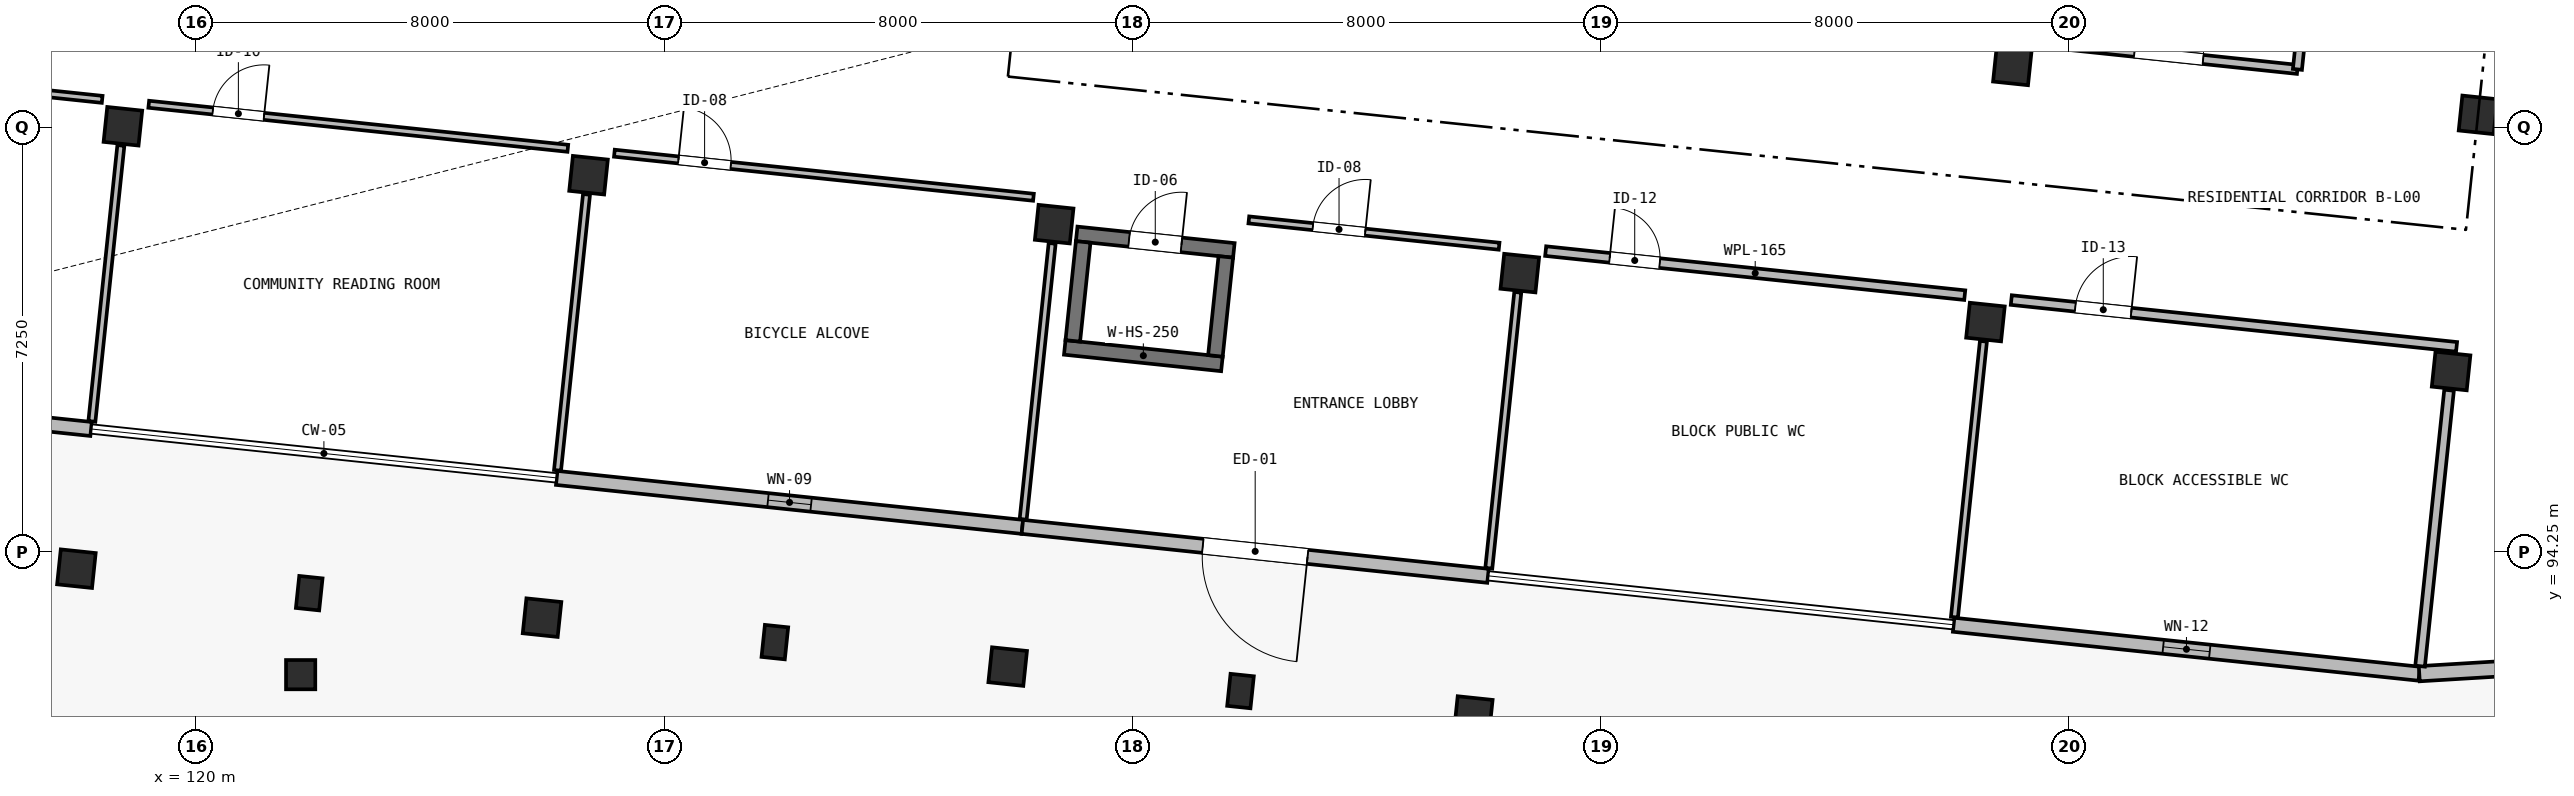
"""IFC4 building model, lengths in metres.
Left out: names, types, materials, properties, quantities, classifications, styles, units other than length and angle.
Written with IfcOpenShell. Run it as: python <this file> out.ifc"""

import sys

from ifc_helpers import new_model, si_unit, direction, frame, frame_2d, origin, origin_2d, place, context, subcontext, project, spatial, rectangle, extrude, element, fill, save


model = new_model("IFC4")
c1 = context("Model", 3, precision=1e-05, world=origin(), true_north=direction((0.0, 1.0)))
c2 = subcontext(c1, "Body", "Model", "MODEL_VIEW")
j1 = project(units=[si_unit("LENGTHUNIT", "METRE"), si_unit("PLANEANGLEUNIT", "RADIAN")], contexts=[c1])
p1 = place(None, origin())
s1 = spatial("IfcSite", under=j1, at=p1, CompositionType="ELEMENT")
p2 = place(p1, origin())
s2 = spatial("IfcBuilding", under=s1, at=p2, CompositionType="ELEMENT")
p3 = place(p2, origin())
s3 = spatial("IfcBuildingStorey", under=s2, at=p3, CompositionType="ELEMENT", Elevation=0.0)
for number, where, z_axis, x_axis in (
    (1, (117.956, 93.964, -0.35), (0.0, 0.0, 1.0), (0.995, -0.105, 0.0)),
    (2, (118.75, 101.522, -0.35), (0.0, 0.0, 1.0), (0.995, -0.105, 0.0)),
    (3, (125.912, 93.127, -0.35), (0.0, 0.0, 1.0), (0.995, -0.105, 0.0)),
    (4, (126.707, 100.686, -0.35), (0.0, 0.0, 1.0), (0.995, -0.105, 0.0)),
    (5, (133.868, 92.291, -0.35), (0.0, 0.0, 1.0), (0.995, -0.105, 0.0)),
    (6, (134.663, 99.85, -0.35), (0.0, 0.0, 1.0), (0.995, -0.105, 0.0)),
    (7, (141.825, 91.455, -0.35), (0.0, 0.0, 1.0), (0.995, -0.105, 0.0)),
    (8, (142.619, 99.013, -0.35), (0.0, 0.0, 1.0), (0.995, -0.105, 0.0)),
    (9, (150.575, 98.177, -0.35), (0.0, 0.0, 1.0), (0.995, -0.105, 0.0)),
    (10, (151.035, 102.553, -0.35), (0.0, 0.0, 1.0), (0.995, -0.105, 0.0)),
    (11, (158.531, 97.341, -0.35), (0.0, 0.0, 1.0), (0.995, -0.105, 0.0)),
    (12, (158.991, 101.717, -0.35), (0.0, 0.0, 1.0), (0.995, -0.105, 0.0)),
):
    element("IfcColumn", number, at=place(p3, frame(where, z_axis=z_axis, x_axis=x_axis)), inside=s3, PredefinedType="COLUMN", context=c2, shape_type="SweptSolid", body=[
        extrude(rectangle(XDim=0.6, YDim=0.6, at=origin_2d()), origin(), (0.0, 0.0, 1.0), 4.85),
    ])
for number, where, z_axis, x_axis in (
    (13, (121.934, 93.546, -0.35), (0.0, 0.0, 1.0), (0.995, -0.105, 0.0)),
    (14, (129.89, 92.709, -0.35), (0.0, 0.0, 1.0), (0.995, -0.105, 0.0)),
    (15, (137.847, 91.873, -0.35), (0.0, 0.0, 1.0), (0.995, -0.105, 0.0)),
):
    element("IfcColumn", number, at=place(p3, frame(where, z_axis=z_axis, x_axis=x_axis)), inside=s3, PredefinedType="PILASTER", context=c2, shape_type="SweptSolid", body=[
        extrude(rectangle(XDim=0.4, YDim=0.55, at=origin_2d()), origin(), (0.0, 0.0, 1.0), 3.7),
    ])
p4 = place(p3, frame((134.844, 97.744, -0.35), z_axis=(0.0, 0.0, 1.0), x_axis=(0.994522285292, -0.104524753323, 0.0)))
e16 = element("IfcWall", 16, at=p4, inside=s3, PredefinedType="SHEAR", context=c2, shape_type="SweptSolid", body=[
    extrude(rectangle(XDim=2.7, YDim=0.25, at=frame_2d((1.35, 0.0))), origin(), (0.0, 0.0, 1.0), 4.85),
])
p5 = place(p3, frame((135.048, 99.684, -0.35), z_axis=(0.0, 0.0, 1.0), x_axis=(0.994522285292, -0.104524753323, 0.0)))
e17 = element("IfcWall", 17, at=p5, inside=s3, PredefinedType="SHEAR", context=c2, shape_type="SweptSolid", body=[
    extrude(rectangle(XDim=2.7, YDim=0.25, at=frame_2d((1.35, 0.0))), origin(), (0.0, 0.0, 1.0), 4.85),
])
p6 = place(p5, frame((0.9, 0.0, 0.35)))
e18 = element("IfcOpeningElement", 18, at=p6, cuts=e17, PredefinedType="OPENING", context=c2, shape_type="SweptSolid", body=[
    extrude(rectangle(XDim=0.9, YDim=2.05, at=frame_2d((0.45, 1.025))), frame((0.0, 0.14, 0.0), z_axis=(0.0, -1.0, 0.0), x_axis=(1.0, 0.0, 0.0)), (0.0, 0.0, 1.0), 0.28),
])
for number, where, z_axis, x_axis in (
    (19, (134.981, 97.855, -0.35), (0.0, 0.0, 1.0), (0.105, 0.995, 0.0)),
    (20, (137.418, 97.599, -0.35), (0.0, 0.0, 1.0), (0.105, 0.995, 0.0)),
):
    element("IfcWall", number, at=place(p3, frame(where, z_axis=z_axis, x_axis=x_axis)), inside=s3, PredefinedType="SHEAR", context=c2, shape_type="SweptSolid", body=[
        extrude(rectangle(XDim=1.7, YDim=0.25, at=frame_2d((0.85, 0.0))), origin(), (0.0, 0.0, 1.0), 4.85),
    ])
p7 = place(p3, frame((121.788, 92.153, -0.35), z_axis=(0.0, 0.0, 1.0), x_axis=(1.0, 0.0, 0.0)))
e21 = element("IfcColumn", 21, at=p7, inside=s3, PredefinedType="COLUMN", context=c2, shape_type="SweptSolid", body=[
    extrude(rectangle(XDim=0.5, YDim=0.5, at=origin_2d()), origin(), (0.0, 0.0, 1.0), 4.55),
])
p8 = place(p3, frame((118.207, 96.351, 0.0), z_axis=(0.0, 0.0, 1.0), x_axis=(-0.994522329422, 0.104524333444, 0.0)))
e22 = element("IfcWall", 22, at=p8, inside=s3, PredefinedType="SOLIDWALL", context=c2, shape_type="SweptSolid", body=[
    extrude(rectangle(XDim=8.0, YDim=0.24, at=frame_2d((4.0, 0.0))), origin(), (0.0, 0.0, 1.0), 3.35),
])
p9 = place(p8, frame((3.65, 0.0, 0.55)))
e23 = element("IfcOpeningElement", 23, at=p9, cuts=e22, PredefinedType="OPENING", context=c2, shape_type="SweptSolid", body=[
    extrude(rectangle(XDim=0.7, YDim=2.36, at=frame_2d((0.35, 1.18))), frame((0.0, 0.135, 0.0), z_axis=(0.0, -1.0, 0.0), x_axis=(1.0, 0.0, 0.0)), (0.0, 0.0, 1.0), 0.27),
])
p10 = place(p3, frame((134.119, 94.678, 0.0), z_axis=(0.0, 0.0, 1.0), x_axis=(-0.994522329422, 0.104524333444, 0.0)))
e24 = element("IfcWall", 24, at=p10, inside=s3, PredefinedType="SOLIDWALL", context=c2, shape_type="SweptSolid", body=[
    extrude(rectangle(XDim=8.0, YDim=0.24, at=frame_2d((4.0, 0.0))), origin(), (0.0, 0.0, 1.0), 3.35),
])
p11 = place(p10, frame((3.63, 0.0, 0.55)))
e25 = element("IfcOpeningElement", 25, at=p11, cuts=e24, PredefinedType="OPENING", context=c2, shape_type="SweptSolid", body=[
    extrude(rectangle(XDim=0.74, YDim=2.26, at=frame_2d((0.37, 1.13))), frame((0.0, 0.135, 0.0), z_axis=(0.0, -1.0, 0.0), x_axis=(1.0, 0.0, 0.0)), (0.0, 0.0, 1.0), 0.27),
])
p12 = place(p3, frame((142.076, 93.842, 0.0), z_axis=(0.0, 0.0, 1.0), x_axis=(-0.994522662826, 0.104521161134, 0.0)))
e26 = element("IfcWall", 26, at=p12, inside=s3, PredefinedType="SOLIDWALL", context=c2, shape_type="SweptSolid", body=[
    extrude(rectangle(XDim=8.0, YDim=0.24, at=frame_2d((4.0, 0.0))), origin(), (0.0, 0.0, 1.0), 3.35),
])
p13 = place(p12, frame((3.1, 0.0, 0.0)))
e27 = element("IfcOpeningElement", 27, at=p13, cuts=e26, PredefinedType="OPENING", context=c2, shape_type="SweptSolid", body=[
    extrude(rectangle(XDim=1.8, YDim=2.4, at=frame_2d((0.9, 1.2))), frame((0.0, 0.135, 0.0), z_axis=(0.0, -1.0, 0.0), x_axis=(1.0, 0.0, 0.0)), (0.0, 0.0, 1.0), 0.27),
])
p14 = place(p3, frame((157.988, 92.169, 0.0), z_axis=(0.0, 0.0, 1.0), x_axis=(-0.994522662826, 0.104521161134, 0.0)))
e28 = element("IfcWall", 28, at=p14, inside=s3, PredefinedType="SOLIDWALL", context=c2, shape_type="SweptSolid", body=[
    extrude(rectangle(XDim=8.0, YDim=0.24, at=frame_2d((4.0, 0.0))), origin(), (0.0, 0.0, 1.0), 3.35),
])
p15 = place(p14, frame((3.6, 0.0, 0.55)))
e29 = element("IfcOpeningElement", 29, at=p15, cuts=e28, PredefinedType="OPENING", context=c2, shape_type="SweptSolid", body=[
    extrude(rectangle(XDim=0.8, YDim=2.3, at=frame_2d((0.4, 1.15))), frame((0.0, 0.135, 0.0), z_axis=(0.0, -1.0, 0.0), x_axis=(1.0, 0.0, 0.0)), (0.0, 0.0, 1.0), 0.27),
])
p16 = place(p3, frame((164.06, 92.537, 0.0), z_axis=(0.0, 0.0, 1.0), x_axis=(-0.99817385414, -0.060406596585, 0.0)))
e30 = element("IfcWall", 30, at=p16, inside=s3, PredefinedType="SOLIDWALL", context=c2, shape_type="SweptSolid", body=[
    extrude(rectangle(XDim=6.083, YDim=0.26, at=frame_2d((3.041, 0.0))), origin(), (0.0, 0.0, 1.0), 3.85),
])
p17 = place(p3, frame((151.53, 102.954, 0.0), z_axis=(0.0, 0.0, 1.0), x_axis=(0.994521251134, -0.104534592565, 0.0)))
e31 = element("IfcWall", 31, at=p17, inside=s3, PredefinedType="PARTITIONING", context=c2, shape_type="SweptSolid", body=[
    extrude(rectangle(XDim=4.4, YDim=0.155, at=frame_2d((2.2, 0.0))), origin(), (0.0, 0.0, 1.0), 4.22),
])
p18 = place(p17, frame((1.6, 0.0, 0.0)))
e32 = element("IfcOpeningElement", 32, at=p18, cuts=e31, PredefinedType="OPENING", context=c2, shape_type="SweptSolid", body=[
    extrude(rectangle(XDim=1.18, YDim=2.15, at=frame_2d((0.59, 1.075))), frame((0.0, 0.093, 0.0), z_axis=(0.0, -1.0, 0.0), x_axis=(1.0, 0.0, 0.0)), (0.0, 0.0, 1.0), 0.185),
])
p19 = place(p3, frame((155.906, 102.494, 0.0), z_axis=(0.0, 0.0, 1.0), x_axis=(0.104494148666, 0.99452550138, 0.0)))
e33 = element("IfcWall", 33, at=p19, inside=s3, PredefinedType="PARTITIONING", context=c2, shape_type="SweptSolid", body=[
    extrude(rectangle(XDim=4.0, YDim=0.155, at=frame_2d((2.0, 0.0))), origin(), (0.0, 0.0, 1.0), 4.22),
])
p20 = place(p19, frame((1.4, 0.0, 0.0)))
e34 = element("IfcOpeningElement", 34, at=p20, cuts=e33, PredefinedType="OPENING", context=c2, shape_type="SweptSolid", body=[
    extrude(rectangle(XDim=1.18, YDim=2.15, at=frame_2d((0.59, 1.075))), frame((0.0, 0.093, 0.0), z_axis=(0.0, -1.0, 0.0), x_axis=(1.0, 0.0, 0.0)), (0.0, 0.0, 1.0), 0.185),
])
p21 = place(p3, frame((111.236, 102.734, 0.0), z_axis=(0.0, 0.0, 1.0), x_axis=(0.994520863291, -0.104538282357, 0.0)))
e35 = element("IfcWall", 35, at=p21, inside=s3, PredefinedType="PARTITIONING", context=c2, shape_type="SweptSolid", body=[
    extrude(rectangle(XDim=7.2, YDim=0.12, at=frame_2d((3.6, 0.0))), origin(), (0.0, 0.0, 1.0), 4.22),
])
p22 = place(p21, frame((1.1, 0.0, 0.0)))
e36 = element("IfcOpeningElement", 36, at=p22, cuts=e35, PredefinedType="OPENING", context=c2, shape_type="SweptSolid", body=[
    extrude(rectangle(XDim=0.9, YDim=2.1, at=frame_2d((0.45, 1.05))), frame((0.0, 0.075, 0.0), z_axis=(0.0, -1.0, 0.0), x_axis=(1.0, 0.0, 0.0)), (0.0, 0.0, 1.0), 0.15),
])
p23 = place(p3, frame((119.192, 101.898, 0.0), z_axis=(0.0, 0.0, 1.0), x_axis=(0.994524017661, -0.104508269032, 0.0)))
e37 = element("IfcWall", 37, at=p23, inside=s3, PredefinedType="PARTITIONING", context=c2, shape_type="SweptSolid", body=[
    extrude(rectangle(XDim=7.2, YDim=0.12, at=frame_2d((3.6, 0.0))), origin(), (0.0, 0.0, 1.0), 4.22),
])
p24 = place(p23, frame((1.1, 0.0, 0.0)))
e38 = element("IfcOpeningElement", 38, at=p24, cuts=e37, PredefinedType="OPENING", context=c2, shape_type="SweptSolid", body=[
    extrude(rectangle(XDim=0.88, YDim=2.1, at=frame_2d((0.44, 1.05))), frame((0.0, 0.075, 0.0), z_axis=(0.0, -1.0, 0.0), x_axis=(1.0, 0.0, 0.0)), (0.0, 0.0, 1.0), 0.15),
])
p25 = place(p3, frame((118.221, 96.48, 0.0), z_axis=(0.0, 0.0, 1.0), x_axis=(0.104510501135, 0.994523783101, 0.0)))
e39 = element("IfcWall", 39, at=p25, inside=s3, PredefinedType="PARTITIONING", context=c2, shape_type="SweptSolid", body=[
    extrude(rectangle(XDim=4.74, YDim=0.12, at=frame_2d((2.37, 0.0))), origin(), (0.0, 0.0, 1.0), 3.32),
])
p26 = place(p3, frame((127.148, 101.062, 0.0), z_axis=(0.0, 0.0, 1.0), x_axis=(0.994520863291, -0.104538282357, 0.0)))
e40 = element("IfcWall", 40, at=p26, inside=s3, PredefinedType="PARTITIONING", context=c2, shape_type="SweptSolid", body=[
    extrude(rectangle(XDim=7.2, YDim=0.12, at=frame_2d((3.6, 0.0))), origin(), (0.0, 0.0, 1.0), 4.22),
])
p27 = place(p26, frame((1.1, 0.0, 0.0)))
e41 = element("IfcOpeningElement", 41, at=p27, cuts=e40, PredefinedType="OPENING", context=c2, shape_type="SweptSolid", body=[
    extrude(rectangle(XDim=0.9, YDim=2.1, at=frame_2d((0.45, 1.05))), frame((0.0, 0.075, 0.0), z_axis=(0.0, -1.0, 0.0), x_axis=(1.0, 0.0, 0.0)), (0.0, 0.0, 1.0), 0.15),
])
p28 = place(p3, frame((126.177, 95.644, 0.0), z_axis=(0.0, 0.0, 1.0), x_axis=(0.104561446505, 0.994518428137, 0.0)))
e42 = element("IfcWall", 42, at=p28, inside=s3, PredefinedType="PARTITIONING", context=c2, shape_type="SweptSolid", body=[
    extrude(rectangle(XDim=4.74, YDim=0.12, at=frame_2d((2.37, 0.0))), origin(), (0.0, 0.0, 1.0), 3.32),
])
p29 = place(p3, frame((137.989, 99.922, 0.0), z_axis=(0.0, 0.0, 1.0), x_axis=(0.994521929513, -0.104528138401, 0.0)))
e43 = element("IfcWall", 43, at=p29, inside=s3, PredefinedType="PARTITIONING", context=c2, shape_type="SweptSolid", body=[
    extrude(rectangle(XDim=4.3, YDim=0.12, at=frame_2d((2.15, 0.0))), origin(), (0.0, 0.0, 1.0), 4.22),
])
p30 = place(p29, frame((1.1, 0.0, 0.0)))
e44 = element("IfcOpeningElement", 44, at=p30, cuts=e43, PredefinedType="OPENING", context=c2, shape_type="SweptSolid", body=[
    extrude(rectangle(XDim=0.9, YDim=2.1, at=frame_2d((0.45, 1.05))), frame((0.0, 0.075, 0.0), z_axis=(0.0, -1.0, 0.0), x_axis=(1.0, 0.0, 0.0)), (0.0, 0.0, 1.0), 0.15),
])
p31 = place(p3, frame((134.133, 94.807, 0.0), z_axis=(0.0, 0.0, 1.0), x_axis=(0.10450514772, 0.994524345655, 0.0)))
e45 = element("IfcWall", 45, at=p31, inside=s3, PredefinedType="PARTITIONING", context=c2, shape_type="SweptSolid", body=[
    extrude(rectangle(XDim=4.74, YDim=0.12, at=frame_2d((2.37, 0.0))), origin(), (0.0, 0.0, 1.0), 3.32),
])
p32 = place(p3, frame((143.061, 99.389, 0.0), z_axis=(0.0, 0.0, 1.0), x_axis=(0.994520863291, -0.104538282357, 0.0)))
e46 = element("IfcWall", 46, at=p32, inside=s3, PredefinedType="PLUMBINGWALL", context=c2, shape_type="SweptSolid", body=[
    extrude(rectangle(XDim=7.2, YDim=0.165, at=frame_2d((3.6, 0.0))), origin(), (0.0, 0.0, 1.0), 4.22),
])
p33 = place(p32, frame((1.1, 0.0, 0.0)))
e47 = element("IfcOpeningElement", 47, at=p33, cuts=e46, PredefinedType="OPENING", context=c2, shape_type="SweptSolid", body=[
    extrude(rectangle(XDim=0.86, YDim=2.1, at=frame_2d((0.43, 1.05))), frame((0.0, 0.097, 0.0), z_axis=(0.0, -1.0, 0.0), x_axis=(1.0, 0.0, 0.0)), (0.0, 0.0, 1.0), 0.195),
])
p34 = place(p3, frame((142.089, 93.971, 0.0), z_axis=(0.0, 0.0, 1.0), x_axis=(0.104556090539, 0.994518991237, 0.0)))
e48 = element("IfcWall", 48, at=p34, inside=s3, PredefinedType="PARTITIONING", context=c2, shape_type="SweptSolid", body=[
    extrude(rectangle(XDim=4.74, YDim=0.12, at=frame_2d((2.37, 0.0))), origin(), (0.0, 0.0, 1.0), 3.32),
])
p35 = place(p3, frame((151.017, 98.553, 0.0), z_axis=(0.0, 0.0, 1.0), x_axis=(0.994519433956, -0.104551879393, 0.0)))
e49 = element("IfcWall", 49, at=p35, inside=s3, PredefinedType="PLUMBINGWALL", context=c2, shape_type="SweptSolid", body=[
    extrude(rectangle(XDim=7.65, YDim=0.165, at=frame_2d((3.825, 0.0))), origin(), (0.0, 0.0, 1.0), 4.22),
])
p36 = place(p35, frame((1.1, 0.0, 0.0)))
e50 = element("IfcOpeningElement", 50, at=p36, cuts=e49, PredefinedType="OPENING", context=c2, shape_type="SweptSolid", body=[
    extrude(rectangle(XDim=0.96, YDim=2.12, at=frame_2d((0.48, 1.06))), frame((0.0, 0.097, 0.0), z_axis=(0.0, -1.0, 0.0), x_axis=(1.0, 0.0, 0.0)), (0.0, 0.0, 1.0), 0.195),
])
p37 = place(p3, frame((150.045, 93.135, 0.0), z_axis=(0.0, 0.0, 1.0), x_axis=(0.10450514772, 0.994524345655, 0.0)))
e51 = element("IfcWall", 51, at=p37, inside=s3, PredefinedType="PARTITIONING", context=c2, shape_type="SweptSolid", body=[
    extrude(rectangle(XDim=4.74, YDim=0.12, at=frame_2d((2.37, 0.0))), origin(), (0.0, 0.0, 1.0), 3.32),
])
p38 = place(p3, frame((158.001, 92.299, 0.0), z_axis=(0.0, 0.0, 1.0), x_axis=(0.104561446505, 0.994518428137, 0.0)))
e52 = element("IfcWall", 52, at=p38, inside=s3, PredefinedType="PLUMBINGWALL", context=c2, shape_type="SweptSolid", body=[
    extrude(rectangle(XDim=4.74, YDim=0.165, at=frame_2d((2.37, 0.0))), origin(), (0.0, 0.0, 1.0), 3.32),
])
p39 = place(p11, origin())
e53 = element("IfcWindow", 53, at=p39, inside=s3, PartitioningType="SINGLE_PANEL", PredefinedType="WINDOW", context=c2, shape_type="SweptSolid", body=[
    extrude(rectangle(XDim=0.74, YDim=2.26, at=frame_2d((0.37, 1.13))), frame((0.0, 0.03, 0.0), z_axis=(0.0, -1.0, 0.0), x_axis=(1.0, 0.0, 0.0)), (0.0, 0.0, 1.0), 0.06),
])
fill(e25, e53)
p40 = place(p13, origin())
e54 = element("IfcDoor", 54, at=p40, inside=s3, OperationType="DOUBLE_DOOR_SINGLE_SWING", PredefinedType="DOOR", context=c2, shape_type="SweptSolid", body=[
    extrude(rectangle(XDim=1.8, YDim=2.4, at=frame_2d((0.9, 1.2))), frame((0.0, 0.025, 0.0), z_axis=(0.0, -1.0, 0.0), x_axis=(1.0, 0.0, 0.0)), (0.0, 0.0, 1.0), 0.05),
])
fill(e27, e54)
p41 = place(p15, origin())
e55 = element("IfcWindow", 55, at=p41, inside=s3, PartitioningType="SINGLE_PANEL", PredefinedType="WINDOW", context=c2, shape_type="SweptSolid", body=[
    extrude(rectangle(XDim=0.8, YDim=2.3, at=frame_2d((0.4, 1.15))), frame((0.0, 0.03, 0.0), z_axis=(0.0, -1.0, 0.0), x_axis=(1.0, 0.0, 0.0)), (0.0, 0.0, 1.0), 0.06),
])
fill(e29, e55)
p42 = place(p18, origin())
e56 = element("IfcDoor", 56, at=p42, inside=s3, OperationType="SINGLE_SWING_LEFT", PredefinedType="DOOR", context=c2, shape_type="SweptSolid", body=[
    extrude(rectangle(XDim=1.18, YDim=2.15, at=frame_2d((0.59, 1.075))), frame((0.0, 0.025, 0.0), z_axis=(0.0, -1.0, 0.0), x_axis=(1.0, 0.0, 0.0)), (0.0, 0.0, 1.0), 0.05),
])
fill(e32, e56)
p43 = place(p24, origin())
e57 = element("IfcDoor", 57, at=p43, inside=s3, OperationType="SINGLE_SWING_RIGHT", PredefinedType="DOOR", context=c2, shape_type="SweptSolid", body=[
    extrude(rectangle(XDim=0.88, YDim=2.1, at=frame_2d((0.44, 1.05))), frame((0.0, 0.025, 0.0), z_axis=(0.0, -1.0, 0.0), x_axis=(1.0, 0.0, 0.0)), (0.0, 0.0, 1.0), 0.05),
])
fill(e38, e57)
p44 = place(p27, origin())
e58 = element("IfcDoor", 58, at=p44, inside=s3, OperationType="SINGLE_SWING_LEFT", PredefinedType="DOOR", context=c2, shape_type="SweptSolid", body=[
    extrude(rectangle(XDim=0.9, YDim=2.1, at=frame_2d((0.45, 1.05))), frame((0.0, 0.025, 0.0), z_axis=(0.0, -1.0, 0.0), x_axis=(1.0, 0.0, 0.0)), (0.0, 0.0, 1.0), 0.05),
])
fill(e41, e58)
p45 = place(p30, origin())
e59 = element("IfcDoor", 59, at=p45, inside=s3, OperationType="SINGLE_SWING_RIGHT", PredefinedType="DOOR", context=c2, shape_type="SweptSolid", body=[
    extrude(rectangle(XDim=0.9, YDim=2.1, at=frame_2d((0.45, 1.05))), frame((0.0, 0.025, 0.0), z_axis=(0.0, -1.0, 0.0), x_axis=(1.0, 0.0, 0.0)), (0.0, 0.0, 1.0), 0.05),
])
fill(e44, e59)
p46 = place(p33, origin())
e60 = element("IfcDoor", 60, at=p46, inside=s3, OperationType="SINGLE_SWING_LEFT", PredefinedType="DOOR", context=c2, shape_type="SweptSolid", body=[
    extrude(rectangle(XDim=0.86, YDim=2.1, at=frame_2d((0.43, 1.05))), frame((0.0, 0.025, 0.0), z_axis=(0.0, -1.0, 0.0), x_axis=(1.0, 0.0, 0.0)), (0.0, 0.0, 1.0), 0.05),
])
fill(e47, e60)
p47 = place(p36, origin())
e61 = element("IfcDoor", 61, at=p47, inside=s3, OperationType="SINGLE_SWING_RIGHT", PredefinedType="DOOR", context=c2, shape_type="SweptSolid", body=[
    extrude(rectangle(XDim=0.96, YDim=2.12, at=frame_2d((0.48, 1.06))), frame((0.0, 0.025, 0.0), z_axis=(0.0, -1.0, 0.0), x_axis=(1.0, 0.0, 0.0)), (0.0, 0.0, 1.0), 0.05),
])
fill(e50, e61)
p48 = place(p6, origin())
e62 = element("IfcDoor", 62, at=p48, inside=s3, OperationType="SINGLE_SWING_RIGHT", PredefinedType="DOOR", context=c2, shape_type="SweptSolid", body=[
    extrude(rectangle(XDim=0.9, YDim=2.05, at=frame_2d((0.45, 1.025))), frame((0.0, 0.025, 0.0), z_axis=(0.0, -1.0, 0.0), x_axis=(1.0, 0.0, 0.0)), (0.0, 0.0, 1.0), 0.05),
])
fill(e18, e62)
save(model, sys.argv[1])
